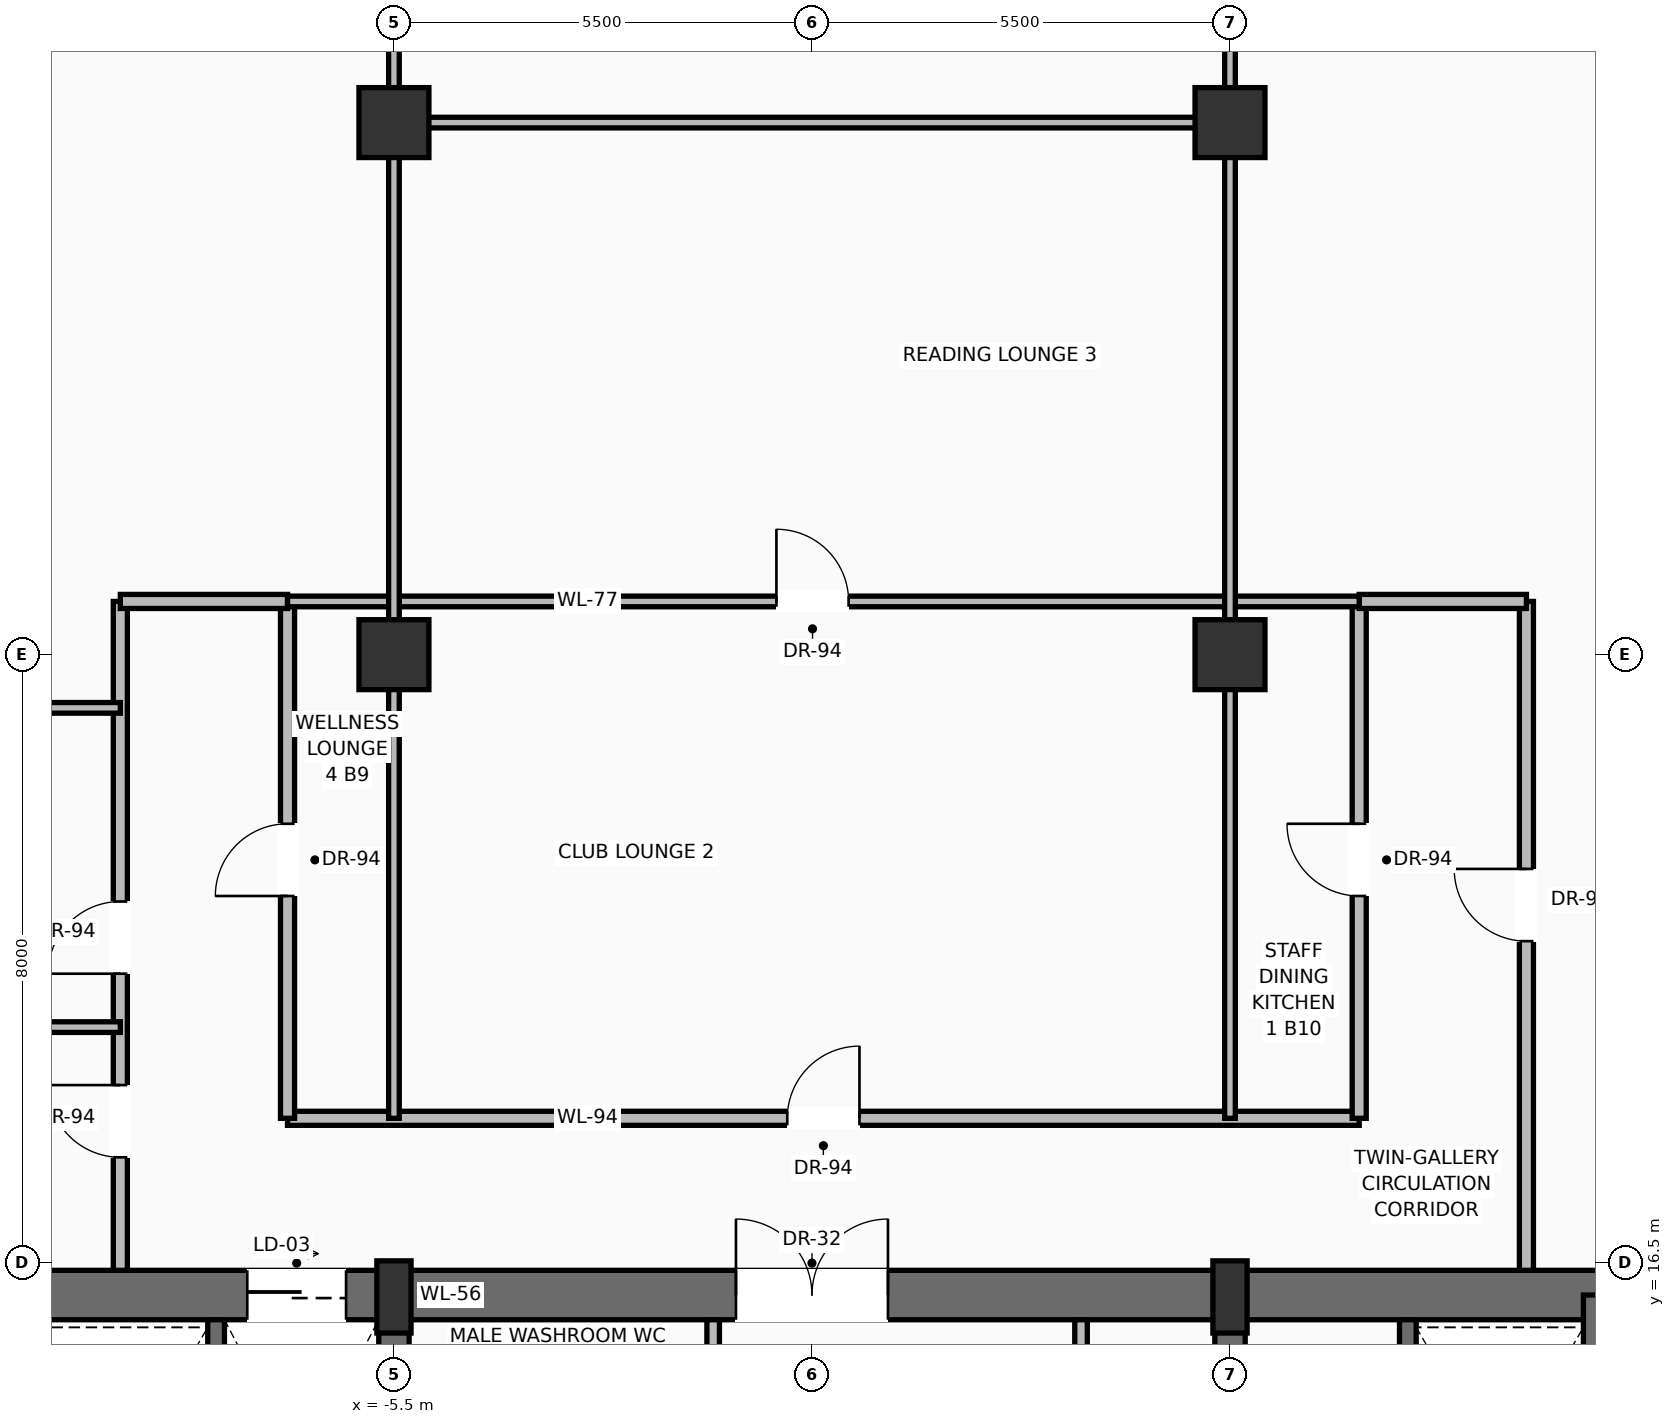
"""IFC4 building model, lengths in metres.
Left out: names, types, materials, properties, quantities, classifications, styles, units other than length and angle.
Written with IfcOpenShell. Run it as: python <this file> out.ifc"""

import sys

from ifc_helpers import new_model, si_unit, direction, frame, frame_2d, origin, origin_2d, place, context, subcontext, project, spatial, rectangle, extrude, source, transform, mapped, element, fill, save


model = new_model("IFC4")
c1 = context("Model", 3, precision=1e-05, world=origin(), true_north=direction((0.0, 1.0)))
c2 = subcontext(c1, "Body", "Model", "MODEL_VIEW")
j1 = project(units=[si_unit("LENGTHUNIT", "METRE"), si_unit("PLANEANGLEUNIT", "RADIAN")], contexts=[c1])
p1 = place(None, origin())
s1 = spatial("IfcSite", under=j1, at=p1, CompositionType="ELEMENT")
p2 = place(p1, origin())
s2 = spatial("IfcBuilding", under=s1, at=p2, CompositionType="ELEMENT")
p3 = place(p2, frame((0.0, 0.0, 151.5)))
s3 = spatial("IfcBuildingStorey", under=s2, at=p3, CompositionType="ELEMENT", Elevation=151.5)
p4 = place(p3, frame((-10.8, 16.075, 0.0), z_axis=(0.0, 0.0, 1.0), x_axis=(1.0, 0.0, 0.0)))
e1 = element("IfcWall", 1, at=p4, inside=s3, PredefinedType="SHEAR", context=c2, shape_type="SweptSolid", body=[
    extrude(rectangle(XDim=21.6, YDim=0.65, at=frame_2d((10.8, 0.0))), origin(), (0.0, 0.0, 1.0), 3.47),
])
p5 = place(p4, frame((3.37, 0.0, 0.0)))
e2 = element("IfcOpeningElement", 2, at=p5, cuts=e1, PredefinedType="OPENING", context=c2, shape_type="SweptSolid", body=[
    extrude(rectangle(XDim=1.3, YDim=2.3, at=frame_2d((0.65, 1.15))), frame((0.0, 0.335, 0.0), z_axis=(0.0, -1.0, 0.0), x_axis=(1.0, 0.0, 0.0)), (0.0, 0.0, 1.0), 0.67),
])
p6 = place(p4, frame((9.8, 0.0, 0.0)))
e3 = element("IfcOpeningElement", 3, at=p6, cuts=e1, PredefinedType="OPENING", context=c2, shape_type="SweptSolid", body=[
    extrude(rectangle(XDim=2.0, YDim=2.4, at=frame_2d((1.0, 1.2))), frame((0.0, 0.335, 0.0), z_axis=(0.0, -1.0, 0.0), x_axis=(1.0, 0.0, 0.0)), (0.0, 0.0, 1.0), 0.67),
])
p7 = place(p3, frame((10.475, 0.525, 0.0), z_axis=(0.0, 0.0, 1.0), x_axis=(0.0, 1.0, 0.0)))
e4 = element("IfcWall", 4, at=p7, inside=s3, PredefinedType="SHEAR", context=c2, shape_type="SweptSolid", body=[
    extrude(rectangle(XDim=15.55, YDim=0.65, at=frame_2d((7.775, 0.0))), origin(), (0.0, 0.0, 1.0), 3.47),
])
p8 = place(p3, frame((-5.5, 0.525, 0.0), z_axis=(0.0, 0.0, 1.0), x_axis=(0.0, 1.0, 0.0)))
e5 = element("IfcWall", 5, at=p8, inside=s3, PredefinedType="SHEAR", context=c2, shape_type="SweptSolid", body=[
    extrude(rectangle(XDim=15.55, YDim=0.4, at=frame_2d((7.775, 0.0))), origin(), (0.0, 0.0, 1.0), 3.47),
])
p9 = place(p8, frame((8.975, 0.0, 0.0)))
e6 = element("IfcOpeningElement", 6, at=p9, cuts=e5, PredefinedType="OPENING", context=c2, shape_type="SweptSolid", body=[
    extrude(rectangle(XDim=1.1, YDim=2.2, at=frame_2d((0.55, 1.1))), frame((0.0, 0.21, 0.0), z_axis=(0.0, -1.0, 0.0), x_axis=(1.0, 0.0, 0.0)), (0.0, 0.0, 1.0), 0.42),
])
p10 = place(p3, frame((5.5, 0.525, 0.0), z_axis=(0.0, 0.0, 1.0), x_axis=(0.0, 1.0, 0.0)))
e7 = element("IfcWall", 7, at=p10, inside=s3, PredefinedType="SHEAR", context=c2, shape_type="SweptSolid", body=[
    extrude(rectangle(XDim=15.55, YDim=0.4, at=frame_2d((7.775, 0.0))), origin(), (0.0, 0.0, 1.0), 3.47),
])
p11 = place(p10, frame((8.975, 0.0, 0.0)))
e8 = element("IfcOpeningElement", 8, at=p11, cuts=e7, PredefinedType="OPENING", context=c2, shape_type="SweptSolid", body=[
    extrude(rectangle(XDim=1.1, YDim=2.2, at=frame_2d((0.55, 1.1))), frame((0.0, 0.21, 0.0), z_axis=(0.0, -1.0, 0.0), x_axis=(1.0, 0.0, 0.0)), (0.0, 0.0, 1.0), 0.42),
])
m1 = source(origin(), c2, "Body", "SweptSolid", [
    extrude(rectangle(XDim=0.45, YDim=0.95, at=origin_2d()), origin(), (0.0, 0.0, 1.0), 3.7),
])
for number, where, z_axis, x_axis in (
    (9, (-5.5, 16.05, 0.0), (0.0, 0.0, 1.0), (1.0, 0.0, 0.0)),
    (10, (5.5, 16.05, 0.0), (0.0, 0.0, 1.0), (1.0, 0.0, 0.0)),
):
    element("IfcColumn", number, at=place(p3, frame(where, z_axis=z_axis, x_axis=x_axis)), inside=s3, PredefinedType="PILASTER", context=c2, shape_type="MappedRepresentation", body=[
        mapped(m1, transform((0.0, 0.0, 0.0), scale=1.0)),
    ])
m2 = source(origin(), c2, "Body", "SweptSolid", [
    extrude(rectangle(XDim=0.92, YDim=0.92, at=origin_2d()), origin(), (0.0, 0.0, 1.0), 3.7),
])
for number, where, z_axis, x_axis in (
    (11, (-5.5, 24.5, 0.0), (0.0, 0.0, 1.0), (1.0, 0.0, 0.0)),
    (12, (5.5, 24.5, 0.0), (0.0, 0.0, 1.0), (1.0, 0.0, 0.0)),
    (13, (-5.5, 31.5, 0.0), (0.0, 0.0, 1.0), (1.0, 0.0, 0.0)),
    (14, (5.5, 31.5, 0.0), (0.0, 0.0, 1.0), (1.0, 0.0, 0.0)),
):
    element("IfcColumn", number, at=place(p3, frame(where, z_axis=z_axis, x_axis=x_axis)), inside=s3, PredefinedType="COLUMN", context=c2, shape_type="MappedRepresentation", body=[
        mapped(m2, transform((0.0, 0.0, 0.0), scale=1.0)),
    ])
for number, where, z_axis, x_axis in (
    (15, (-7.84, 11.87, 0.0), (0.0, 0.0, 1.0), (0.0, 1.0, 0.0)),
    (16, (7.84, 11.87, 0.0), (0.0, 0.0, 1.0), (0.0, 1.0, 0.0)),
):
    element("IfcWall", number, at=place(p3, frame(where, z_axis=z_axis, x_axis=x_axis)), inside=s3, PredefinedType="SOLIDWALL", context=c2, shape_type="SweptSolid", body=[
        extrude(rectangle(XDim=3.88, YDim=0.22, at=frame_2d((1.94, 0.0))), origin(), (0.0, 0.0, 1.0), 3.47),
    ])
p12 = place(p3, frame((-1.3, 13.6, 0.0), z_axis=(0.0, 0.0, 1.0), x_axis=(0.0, 1.0, 0.0)))
e17 = element("IfcWall", 17, at=p12, inside=s3, PredefinedType="PARTITIONING", context=c2, shape_type="SweptSolid", body=[
    extrude(rectangle(XDim=2.15, YDim=0.165, at=frame_2d((1.075, 0.0))), origin(), (0.0, 0.0, 1.0), 3.462),
])
p13 = place(p12, frame((0.55, 0.0, 0.0)))
e18 = element("IfcOpeningElement", 18, at=p13, cuts=e17, PredefinedType="OPENING", context=c2, shape_type="SweptSolid", body=[
    extrude(rectangle(XDim=0.9, YDim=2.1, at=frame_2d((0.45, 1.05))), frame((0.0, 0.093, 0.0), z_axis=(0.0, -1.0, 0.0), x_axis=(1.0, 0.0, 0.0)), (0.0, 0.0, 1.0), 0.185),
])
p14 = place(p3, frame((3.54, 11.22, 0.0), z_axis=(0.0, 0.0, 1.0), x_axis=(0.0, 1.0, 0.0)))
e19 = element("IfcWall", 19, at=p14, inside=s3, PredefinedType="PARTITIONING", context=c2, shape_type="SweptSolid", body=[
    extrude(rectangle(XDim=4.53, YDim=0.165, at=frame_2d((2.265, 0.0))), origin(), (0.0, 0.0, 1.0), 3.462),
])
p15 = place(p14, frame((1.25, 0.0, 0.0)))
e20 = element("IfcOpeningElement", 20, at=p15, cuts=e19, PredefinedType="OPENING", context=c2, shape_type="SweptSolid", body=[
    extrude(rectangle(XDim=0.9, YDim=2.1, at=frame_2d((0.45, 1.05))), frame((0.0, 0.093, 0.0), z_axis=(0.0, -1.0, 0.0), x_axis=(1.0, 0.0, 0.0)), (0.0, 0.0, 1.0), 0.185),
])
p16 = place(p3, frame((-6.9, 18.4, 0.0), z_axis=(0.0, 0.0, 1.0), x_axis=(1.0, 0.0, 0.0)))
e21 = element("IfcWall", 21, at=p16, inside=s3, PredefinedType="PARTITIONING", context=c2, shape_type="SweptSolid", body=[
    extrude(rectangle(XDim=14.1, YDim=0.185, at=frame_2d((7.05, 0.0))), origin(), (0.0, 0.0, 1.0), 2.846),
])
p17 = place(p16, frame((6.575, 0.0, 0.0)))
e22 = element("IfcOpeningElement", 22, at=p17, cuts=e21, PredefinedType="OPENING", context=c2, shape_type="SweptSolid", body=[
    extrude(rectangle(XDim=0.95, YDim=2.2, at=frame_2d((0.475, 1.1))), frame((0.0, 0.103, 0.0), z_axis=(0.0, -1.0, 0.0), x_axis=(1.0, 0.0, 0.0)), (0.0, 0.0, 1.0), 0.205),
])
p18 = place(p3, frame((-6.9, 18.4, 0.0), z_axis=(0.0, 0.0, 1.0), x_axis=(0.0, 1.0, 0.0)))
e23 = element("IfcWall", 23, at=p18, inside=s3, PredefinedType="PARTITIONING", context=c2, shape_type="SweptSolid", body=[
    extrude(rectangle(XDim=6.8, YDim=0.185, at=frame_2d((3.4, 0.0))), origin(), (0.0, 0.0, 1.0), 2.846),
])
p19 = place(p18, frame((2.925, 0.0, 0.0)))
e24 = element("IfcOpeningElement", 24, at=p19, cuts=e23, PredefinedType="OPENING", context=c2, shape_type="SweptSolid", body=[
    extrude(rectangle(XDim=0.95, YDim=2.2, at=frame_2d((0.475, 1.1))), frame((0.0, 0.103, 0.0), z_axis=(0.0, -1.0, 0.0), x_axis=(1.0, 0.0, 0.0)), (0.0, 0.0, 1.0), 0.205),
])
p20 = place(p3, frame((7.2, 18.4, 0.0), z_axis=(0.0, 0.0, 1.0), x_axis=(0.0, 1.0, 0.0)))
e25 = element("IfcWall", 25, at=p20, inside=s3, PredefinedType="PARTITIONING", context=c2, shape_type="SweptSolid", body=[
    extrude(rectangle(XDim=6.8, YDim=0.185, at=frame_2d((3.4, 0.0))), origin(), (0.0, 0.0, 1.0), 2.846),
])
p21 = place(p20, frame((2.925, 0.0, 0.0)))
e26 = element("IfcOpeningElement", 26, at=p21, cuts=e25, PredefinedType="OPENING", context=c2, shape_type="SweptSolid", body=[
    extrude(rectangle(XDim=0.95, YDim=2.2, at=frame_2d((0.475, 1.1))), frame((0.0, 0.103, 0.0), z_axis=(0.0, -1.0, 0.0), x_axis=(1.0, 0.0, 0.0)), (0.0, 0.0, 1.0), 0.205),
])
p22 = place(p3, frame((-9.1, 16.4, 0.0), z_axis=(0.0, 0.0, 1.0), x_axis=(0.0, 1.0, 0.0)))
e27 = element("IfcWall", 27, at=p22, inside=s3, PredefinedType="PARTITIONING", context=c2, shape_type="SweptSolid", body=[
    extrude(rectangle(XDim=8.8, YDim=0.185, at=frame_2d((4.4, 0.0))), origin(), (0.0, 0.0, 1.0), 2.846),
])
p23 = place(p22, frame((3.903, 0.0, 0.0)))
e28 = element("IfcOpeningElement", 28, at=p23, cuts=e27, PredefinedType="OPENING", context=c2, shape_type="SweptSolid", body=[
    extrude(rectangle(XDim=0.95, YDim=2.2, at=frame_2d((0.475, 1.1))), frame((0.0, 0.103, 0.0), z_axis=(0.0, -1.0, 0.0), x_axis=(1.0, 0.0, 0.0)), (0.0, 0.0, 1.0), 0.205),
])
p24 = place(p22, frame((1.487, 0.0, 0.0)))
e29 = element("IfcOpeningElement", 29, at=p24, cuts=e27, PredefinedType="OPENING", context=c2, shape_type="SweptSolid", body=[
    extrude(rectangle(XDim=0.95, YDim=2.2, at=frame_2d((0.475, 1.1))), frame((0.0, 0.103, 0.0), z_axis=(0.0, -1.0, 0.0), x_axis=(1.0, 0.0, 0.0)), (0.0, 0.0, 1.0), 0.205),
])
p25 = place(p3, frame((9.4, 16.4, 0.0), z_axis=(0.0, 0.0, 1.0), x_axis=(0.0, 1.0, 0.0)))
e30 = element("IfcWall", 30, at=p25, inside=s3, PredefinedType="PARTITIONING", context=c2, shape_type="SweptSolid", body=[
    extrude(rectangle(XDim=8.8, YDim=0.185, at=frame_2d((4.4, 0.0))), origin(), (0.0, 0.0, 1.0), 2.846),
])
p26 = place(p25, frame((4.331, 0.0, 0.0)))
e31 = element("IfcOpeningElement", 31, at=p26, cuts=e30, PredefinedType="OPENING", context=c2, shape_type="SweptSolid", body=[
    extrude(rectangle(XDim=0.95, YDim=2.2, at=frame_2d((0.475, 1.1))), frame((0.0, 0.103, 0.0), z_axis=(0.0, -1.0, 0.0), x_axis=(1.0, 0.0, 0.0)), (0.0, 0.0, 1.0), 0.205),
])
p27 = place(p3, frame((-9.1, 25.2, 0.0), z_axis=(0.0, 0.0, 1.0), x_axis=(1.0, 0.0, 0.0)))
e32 = element("IfcWall", 32, at=p27, inside=s3, PredefinedType="PARTITIONING", context=c2, shape_type="SweptSolid", body=[
    extrude(rectangle(XDim=2.2, YDim=0.185, at=frame_2d((1.1, 0.0))), origin(), (0.0, 0.0, 1.0), 3.462),
])
p28 = place(p3, frame((7.2, 25.2, 0.0), z_axis=(0.0, 0.0, 1.0), x_axis=(1.0, 0.0, 0.0)))
e33 = element("IfcWall", 33, at=p28, inside=s3, PredefinedType="PARTITIONING", context=c2, shape_type="SweptSolid", body=[
    extrude(rectangle(XDim=2.2, YDim=0.185, at=frame_2d((1.1, 0.0))), origin(), (0.0, 0.0, 1.0), 3.462),
])
p29 = place(p3, frame((-6.9, 25.2, 0.0), z_axis=(0.0, 0.0, 1.0), x_axis=(1.0, 0.0, 0.0)))
e34 = element("IfcWall", 34, at=p29, inside=s3, PredefinedType="PARTITIONING", context=c2, shape_type="SweptSolid", body=[
    extrude(rectangle(XDim=14.1, YDim=0.14, at=frame_2d((7.05, 0.0))), origin(), (0.0, 0.0, 1.0), 3.462),
])
p30 = place(p29, frame((6.432, 0.0, 0.0)))
e35 = element("IfcOpeningElement", 35, at=p30, cuts=e34, PredefinedType="OPENING", context=c2, shape_type="SweptSolid", body=[
    extrude(rectangle(XDim=0.95, YDim=2.2, at=frame_2d((0.475, 1.1))), frame((0.0, 0.08, 0.0), z_axis=(0.0, -1.0, 0.0), x_axis=(1.0, 0.0, 0.0)), (0.0, 0.0, 1.0), 0.16),
])
for number, where, z_axis, x_axis in (
    (36, (-5.5, 18.4, 0.0), (0.0, 0.0, 1.0), (0.0, 1.0, 0.0)),
    (37, (5.5, 18.4, 0.0), (0.0, 0.0, 1.0), (0.0, 1.0, 0.0)),
):
    element("IfcWall", number, at=place(p3, frame(where, z_axis=z_axis, x_axis=x_axis)), inside=s3, PredefinedType="PARTITIONING", context=c2, shape_type="SweptSolid", body=[
        extrude(rectangle(XDim=14.1, YDim=0.14, at=frame_2d((7.05, 0.0))), origin(), (0.0, 0.0, 1.0), 2.846),
    ])
p31 = place(p3, frame((-5.5, 31.5, 0.0), z_axis=(0.0, 0.0, 1.0), x_axis=(1.0, 0.0, 0.0)))
e38 = element("IfcWall", 38, at=p31, inside=s3, PredefinedType="PARTITIONING", context=c2, shape_type="SweptSolid", body=[
    extrude(rectangle(XDim=11.0, YDim=0.14, at=frame_2d((5.5, 0.0))), origin(), (0.0, 0.0, 1.0), 2.846),
])
p32 = place(p3, frame((-19.288, 19.6, 0.0), z_axis=(0.0, 0.0, 1.0), x_axis=(1.0, 0.0, 0.0)))
e39 = element("IfcWall", 39, at=p32, inside=s3, PredefinedType="PARTITIONING", context=c2, shape_type="SweptSolid", body=[
    extrude(rectangle(XDim=10.188, YDim=0.14, at=frame_2d((5.094, 0.0))), origin(), (0.0, 0.0, 1.0), 3.049),
])
p33 = place(p3, frame((-16.585, 23.8, 0.0), z_axis=(0.0, 0.0, 1.0), x_axis=(1.0, 0.0, 0.0)))
e40 = element("IfcWall", 40, at=p33, inside=s3, PredefinedType="PARTITIONING", context=c2, shape_type="SweptSolid", body=[
    extrude(rectangle(XDim=7.485, YDim=0.14, at=frame_2d((3.742, 0.0))), origin(), (0.0, 0.0, 1.0), 3.462),
])
m3 = source(origin(), c2, "Body", "SweptSolid", [
    extrude(rectangle(XDim=1.3, YDim=2.3, at=frame_2d((0.65, 1.15))), frame((0.0, 0.025, 0.0), z_axis=(0.0, -1.0, 0.0), x_axis=(1.0, 0.0, 0.0)), (0.0, 0.0, 1.0), 0.05),
])
p34 = place(p5, origin())
e41 = element("IfcDoor", 41, at=p34, inside=s3, OperationType="SLIDING_TO_RIGHT", PredefinedType="DOOR", context=c2, shape_type="MappedRepresentation", body=[
    mapped(m3, transform((0.0, 0.0, 0.0), scale=1.0)),
])
fill(e2, e41)
m4 = source(origin(), c2, "Body", "SweptSolid", [
    extrude(rectangle(XDim=2.0, YDim=2.4, at=frame_2d((1.0, 1.2))), frame((0.0, 0.025, 0.0), z_axis=(0.0, -1.0, 0.0), x_axis=(1.0, 0.0, 0.0)), (0.0, 0.0, 1.0), 0.05),
])
p35 = place(p6, origin())
e42 = element("IfcDoor", 42, at=p35, inside=s3, OperationType="DOUBLE_DOOR_SINGLE_SWING", PredefinedType="DOOR", context=c2, shape_type="MappedRepresentation", body=[
    mapped(m4, transform((0.0, 0.0, 0.0), scale=1.0)),
])
fill(e3, e42)
m5 = source(origin(), c2, "Body", "SweptSolid", [
    extrude(rectangle(XDim=0.95, YDim=2.2, at=frame_2d((0.475, 1.1))), frame((0.0, 0.025, 0.0), z_axis=(0.0, -1.0, 0.0), x_axis=(1.0, 0.0, 0.0)), (0.0, 0.0, 1.0), 0.05),
])
p36 = place(p17, origin())
e43 = element("IfcDoor", 43, at=p36, inside=s3, OperationType="SINGLE_SWING_RIGHT", PredefinedType="DOOR", context=c2, shape_type="MappedRepresentation", body=[
    mapped(m5, transform((0.0, 0.0, 0.0), scale=1.0)),
])
fill(e22, e43)
p37 = place(p23, origin())
e44 = element("IfcDoor", 44, at=p37, inside=s3, OperationType="SINGLE_SWING_LEFT", PredefinedType="DOOR", context=c2, shape_type="MappedRepresentation", body=[
    mapped(m5, transform((0.0, 0.0, 0.0), scale=1.0)),
])
fill(e28, e44)
p38 = place(p26, origin())
e45 = element("IfcDoor", 45, at=p38, inside=s3, OperationType="SINGLE_SWING_RIGHT", PredefinedType="DOOR", context=c2, shape_type="MappedRepresentation", body=[
    mapped(m5, transform((0.0, 0.0, 0.0), scale=1.0)),
])
fill(e31, e45)
p39 = place(p24, origin())
e46 = element("IfcDoor", 46, at=p39, inside=s3, OperationType="SINGLE_SWING_RIGHT", PredefinedType="DOOR", context=c2, shape_type="MappedRepresentation", body=[
    mapped(m5, transform((0.0, 0.0, 0.0), scale=1.0)),
])
fill(e29, e46)
p40 = place(p19, origin())
e47 = element("IfcDoor", 47, at=p40, inside=s3, OperationType="SINGLE_SWING_LEFT", PredefinedType="DOOR", context=c2, shape_type="MappedRepresentation", body=[
    mapped(m5, transform((0.0, 0.0, 0.0), scale=1.0)),
])
fill(e24, e47)
p41 = place(p21, origin())
e48 = element("IfcDoor", 48, at=p41, inside=s3, OperationType="SINGLE_SWING_RIGHT", PredefinedType="DOOR", context=c2, shape_type="MappedRepresentation", body=[
    mapped(m5, transform((0.0, 0.0, 0.0), scale=1.0)),
])
fill(e26, e48)
p42 = place(p30, origin())
e49 = element("IfcDoor", 49, at=p42, inside=s3, OperationType="SINGLE_SWING_LEFT", PredefinedType="DOOR", context=c2, shape_type="MappedRepresentation", body=[
    mapped(m5, transform((0.0, 0.0, 0.0), scale=1.0)),
])
fill(e35, e49)
save(model, sys.argv[1])
